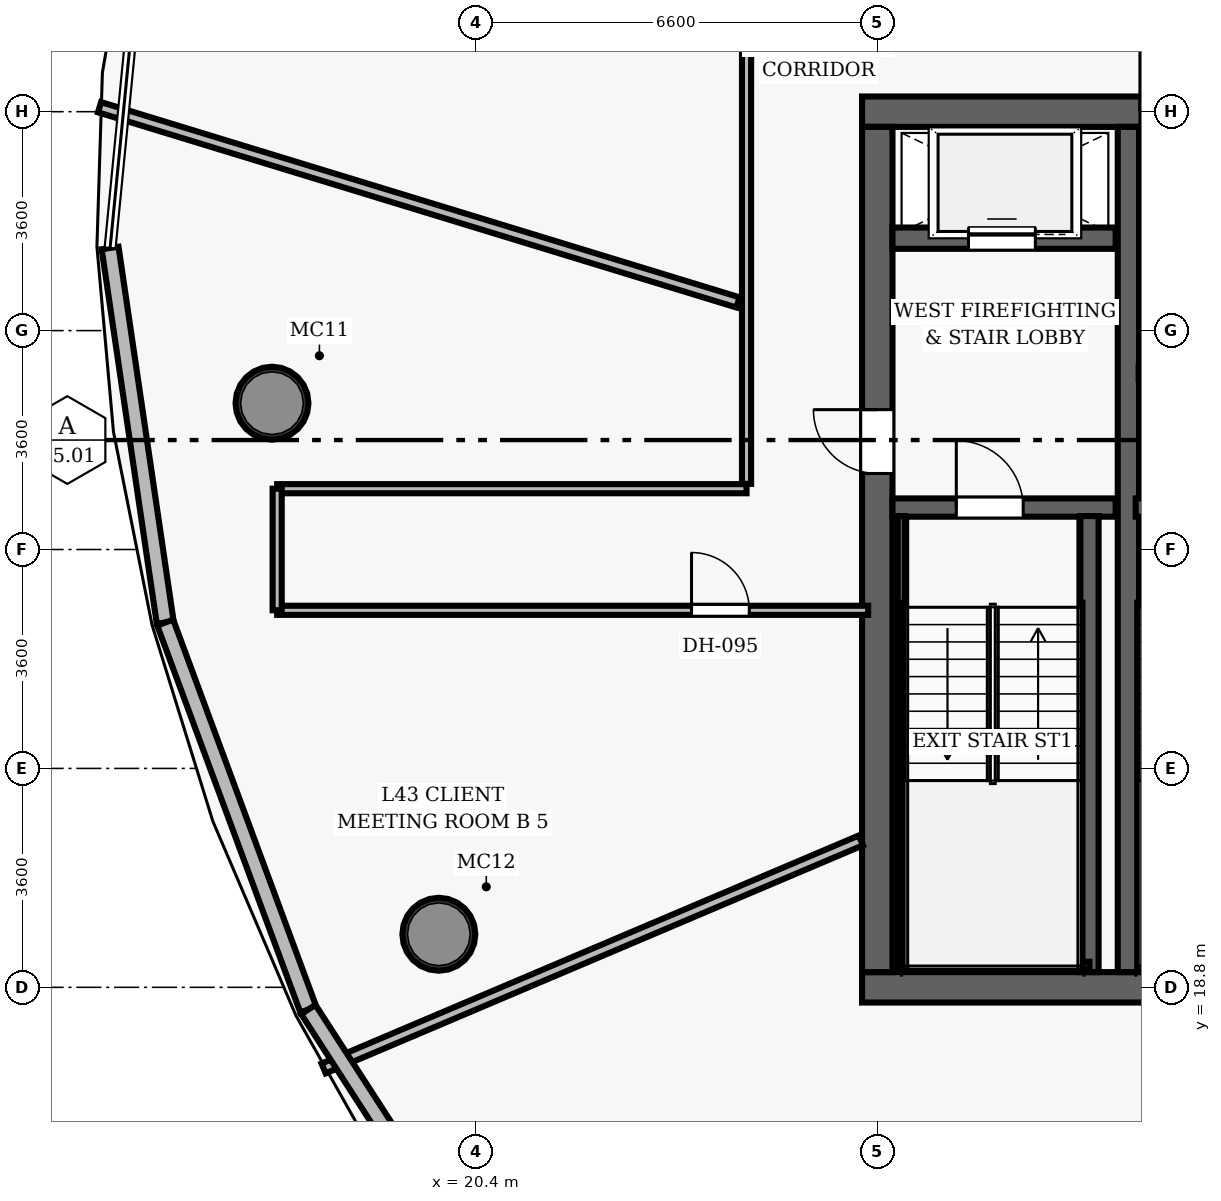
"""IFC4 building model, lengths in metres.
Left out: names, types, materials, properties, quantities, classifications, styles, units other than length and angle.
Written with IfcOpenShell. Run it as: python <this file> out.ifc"""

import sys

from ifc_helpers import new_model, si_unit, direction, frame, frame_2d, origin, origin_2d, place, context, subcontext, project, spatial, rectangle, hollow_circle, extrude, element, fill, save


model = new_model("IFC4")
c1 = context("Model", 3, precision=1e-05, world=origin(), true_north=direction((0.0, 1.0)))
c2 = subcontext(c1, "Body", "Model", "MODEL_VIEW")
j1 = project(units=[si_unit("LENGTHUNIT", "METRE"), si_unit("PLANEANGLEUNIT", "RADIAN")], contexts=[c1])
p1 = place(None, origin())
s1 = spatial("IfcSite", under=j1, at=p1, CompositionType="ELEMENT")
p2 = place(p1, origin())
s2 = spatial("IfcBuilding", under=s1, at=p2, CompositionType="ELEMENT")
p3 = place(p2, frame((0.0, 0.0, 171.2)))
s3 = spatial("IfcBuildingStorey", under=s2, at=p3, CompositionType="ELEMENT", Elevation=171.2)
p4 = place(p3, frame((26.75, 18.8, 0.0), z_axis=(0.0, 0.0, 1.0), x_axis=(1.0, 0.0, 0.0)))
e1 = element("IfcWall", 1, at=p4, inside=s3, PredefinedType="SHEAR", context=c2, shape_type="SweptSolid", body=[
    extrude(rectangle(XDim=22.5, YDim=0.5, at=frame_2d((11.25, 0.0))), origin(), (0.0, 0.0, 1.0), 3.85),
])
p5 = place(p4, frame((14.47, 0.0, 0.0)))
e2 = element("IfcOpeningElement", 2, at=p5, cuts=e1, PredefinedType="OPENING", context=c2, shape_type="SweptSolid", body=[
    extrude(rectangle(XDim=1.05, YDim=2.15, at=frame_2d((0.525, 1.075))), frame((0.0, 0.26, 0.0), z_axis=(0.0, -1.0, 0.0), x_axis=(1.0, 0.0, 0.0)), (0.0, 0.0, 1.0), 0.52),
])
p6 = place(p3, frame((26.75, 33.2, 0.0), z_axis=(0.0, 0.0, 1.0), x_axis=(1.0, 0.0, 0.0)))
e3 = element("IfcWall", 3, at=p6, inside=s3, PredefinedType="SHEAR", context=c2, shape_type="SweptSolid", body=[
    extrude(rectangle(XDim=22.5, YDim=0.5, at=frame_2d((11.25, 0.0))), origin(), (0.0, 0.0, 1.0), 3.85),
])
p7 = place(p6, frame((4.57, 0.0, 0.0)))
e4 = element("IfcOpeningElement", 4, at=p7, cuts=e3, PredefinedType="OPENING", context=c2, shape_type="SweptSolid", body=[
    extrude(rectangle(XDim=1.05, YDim=2.15, at=frame_2d((0.525, 1.075))), frame((0.0, 0.26, 0.0), z_axis=(0.0, -1.0, 0.0), x_axis=(1.0, 0.0, 0.0)), (0.0, 0.0, 1.0), 0.52),
])
p8 = place(p6, frame((14.47, 0.0, 0.0)))
e5 = element("IfcOpeningElement", 5, at=p8, cuts=e3, PredefinedType="OPENING", context=c2, shape_type="SweptSolid", body=[
    extrude(rectangle(XDim=1.05, YDim=2.15, at=frame_2d((0.525, 1.075))), frame((0.0, 0.26, 0.0), z_axis=(0.0, -1.0, 0.0), x_axis=(1.0, 0.0, 0.0)), (0.0, 0.0, 1.0), 0.52),
])
p9 = place(p3, frame((27.0, 19.05, 0.0), z_axis=(0.0, 0.0, 1.0), x_axis=(0.0, 1.0, 0.0)))
e6 = element("IfcWall", 6, at=p9, inside=s3, PredefinedType="SHEAR", context=c2, shape_type="SweptSolid", body=[
    extrude(rectangle(XDim=13.9, YDim=0.5, at=frame_2d((6.95, 0.0))), origin(), (0.0, 0.0, 1.0), 3.85),
])
p10 = place(p9, frame((8.2, 0.0, 0.0)))
e7 = element("IfcOpeningElement", 7, at=p10, cuts=e6, PredefinedType="OPENING", context=c2, shape_type="SweptSolid", body=[
    extrude(rectangle(XDim=1.05, YDim=2.15, at=frame_2d((0.525, 1.075))), frame((0.0, 0.26, 0.0), z_axis=(0.0, -1.0, 0.0), x_axis=(1.0, 0.0, 0.0)), (0.0, 0.0, 1.0), 0.52),
])
p11 = place(p3, frame((31.13, 19.05, 0.0), z_axis=(0.0, 0.0, 1.0), x_axis=(0.0, 1.0, 0.0)))
e8 = element("IfcWall", 8, at=p11, inside=s3, PredefinedType="SHEAR", context=c2, shape_type="SweptSolid", body=[
    extrude(rectangle(XDim=13.9, YDim=0.35, at=frame_2d((6.95, 0.0))), origin(), (0.0, 0.0, 1.0), 3.85),
])
for number, where, z_axis, x_axis in (
    (9, (17.045, 28.406, 0.0), (0.0, 0.0, 1.0), (1.0, 0.0, 0.0)),
    (10, (19.79, 19.673, 0.0), (0.0, 0.0, 1.0), (1.0, 0.0, 0.0)),
):
    element("IfcColumn", number, at=place(p3, frame(where, z_axis=z_axis, x_axis=x_axis)), inside=s3, PredefinedType="COLUMN", context=c2, shape_type="SweptSolid", body=[
        extrude(hollow_circle(Radius=0.6, WallThickness=0.05, at=origin_2d()), origin(), (0.0, 0.0, 1.0), 3.85),
    ])
p12 = place(p3, frame((27.25, 26.69, 0.0), z_axis=(0.0, 0.0, 1.0), x_axis=(1.0, 0.0, 0.0)))
e11 = element("IfcWall", 11, at=p12, inside=s3, PredefinedType="SHEAR", context=c2, shape_type="SweptSolid", body=[
    extrude(rectangle(XDim=3.67, YDim=0.3, at=frame_2d((1.835, 0.0))), origin(), (0.0, 0.0, 1.0), 3.85),
])
p13 = place(p12, frame((1.05, 0.0, 0.0)))
e12 = element("IfcOpeningElement", 12, at=p13, cuts=e11, PredefinedType="OPENING", context=c2, shape_type="SweptSolid", body=[
    extrude(rectangle(XDim=1.1, YDim=2.15, at=frame_2d((0.55, 1.075))), frame((0.0, 0.16, 0.0), z_axis=(0.0, -1.0, 0.0), x_axis=(1.0, 0.0, 0.0)), (0.0, 0.0, 1.0), 0.32),
])
p14 = place(p3, frame((30.49, 19.05, 0.0), z_axis=(0.0, 0.0, 1.0), x_axis=(0.0, 1.0, 0.0)))
e13 = element("IfcWall", 13, at=p14, inside=s3, PredefinedType="SHEAR", context=c2, shape_type="SweptSolid", body=[
    extrude(rectangle(XDim=7.5, YDim=0.3, at=frame_2d((3.75, 0.0))), origin(), (0.0, 0.0, 1.0), 3.85),
])
p15 = place(p3, frame((27.395, 19.1, 0.0), z_axis=(0.0, 0.0, 1.0), x_axis=(0.0, 1.0, 0.0)))
e14 = element("IfcWall", 14, at=p15, inside=s3, PredefinedType="SHEAR", context=c2, shape_type="SweptSolid", body=[
    extrude(rectangle(XDim=7.45, YDim=0.12, at=frame_2d((3.725, 0.0))), origin(), (0.0, 0.0, 1.0), 3.85),
])
p16 = place(p3, frame((27.395, 19.16, 0.0), z_axis=(0.0, 0.0, 1.0), x_axis=(1.0, 0.0, 0.0)))
e15 = element("IfcWall", 15, at=p16, inside=s3, PredefinedType="SHEAR", context=c2, shape_type="SweptSolid", body=[
    extrude(rectangle(XDim=3.095, YDim=0.12, at=frame_2d((1.547, 0.0))), origin(), (0.0, 0.0, 1.0), 3.85),
])
p17 = place(p3, frame((27.25, 31.12, 0.0), z_axis=(0.0, 0.0, 1.0), x_axis=(1.0, 0.0, 0.0)))
e16 = element("IfcWall", 16, at=p17, inside=s3, PredefinedType="SHEAR", context=c2, shape_type="SweptSolid", body=[
    extrude(rectangle(XDim=3.67, YDim=0.35, at=frame_2d((1.835, 0.0))), origin(), (0.0, 0.0, 1.0), 3.035),
])
p18 = place(p17, frame((1.25, 0.0, 0.0)))
e17 = element("IfcOpeningElement", 17, at=p18, cuts=e16, PredefinedType="OPENING", context=c2, shape_type="SweptSolid", body=[
    extrude(rectangle(XDim=1.1, YDim=2.15, at=frame_2d((0.55, 1.075))), frame((0.0, 0.185, 0.0), z_axis=(0.0, -1.0, 0.0), x_axis=(1.0, 0.0, 0.0)), (0.0, 0.0, 1.0), 0.37),
])
p19 = place(p3, frame((31.25, 26.69, 0.0), z_axis=(0.0, 0.0, 1.0), x_axis=(1.0, 0.0, 0.0)))
e18 = element("IfcWall", 18, at=p19, inside=s3, PredefinedType="SHEAR", context=c2, shape_type="SweptSolid", body=[
    extrude(rectangle(XDim=3.56, YDim=0.3, at=frame_2d((1.78, 0.0))), origin(), (0.0, 0.0, 1.0), 3.85),
])
p20 = place(p19, frame((1.55, 0.0, 0.0)))
e19 = element("IfcOpeningElement", 19, at=p20, cuts=e18, PredefinedType="OPENING", context=c2, shape_type="SweptSolid", body=[
    extrude(rectangle(XDim=1.1, YDim=2.15, at=frame_2d((0.55, 1.075))), frame((0.0, 0.16, 0.0), z_axis=(0.0, -1.0, 0.0), x_axis=(1.0, 0.0, 0.0)), (0.0, 0.0, 1.0), 0.32),
])
p21 = place(p3, frame((31.3, 19.16, 0.0), z_axis=(0.0, 0.0, 1.0), x_axis=(1.0, 0.0, 0.0)))
e20 = element("IfcWall", 20, at=p21, inside=s3, PredefinedType="SHEAR", context=c2, shape_type="SweptSolid", body=[
    extrude(rectangle(XDim=3.04, YDim=0.12, at=frame_2d((1.52, 0.0))), origin(), (0.0, 0.0, 1.0), 3.85),
])
p22 = place(p3, frame((31.3, 28.9, 0.0), z_axis=(0.0, 0.0, 1.0), x_axis=(1.0, 0.0, 0.0)))
e21 = element("IfcWall", 21, at=p22, inside=s3, PredefinedType="PARTITIONING", context=c2, shape_type="SweptSolid", body=[
    extrude(rectangle(XDim=1.12, YDim=0.2, at=frame_2d((0.56, 0.0))), origin(), (0.0, 0.0, 1.0), 3.035),
])
p23 = place(p3, frame((24.85, 27.08, 0.0), z_axis=(0.0, 0.0, 1.0), x_axis=(0.0, 1.0, 0.0)))
e22 = element("IfcWall", 22, at=p23, inside=s3, PredefinedType="PARTITIONING", context=c2, shape_type="SweptSolid", body=[
    extrude(rectangle(XDim=8.12, YDim=0.15, at=frame_2d((4.06, 0.0))), origin(), (0.0, 0.0, 1.0), 3.035),
])
p24 = place(p3, frame((17.131, 27.0, 0.0), z_axis=(0.0, 0.0, 1.0), x_axis=(1.0, 0.0, 0.0)))
e23 = element("IfcWall", 23, at=p24, inside=s3, PredefinedType="PARTITIONING", context=c2, shape_type="SweptSolid", body=[
    extrude(rectangle(XDim=7.719, YDim=0.15, at=frame_2d((3.86, 0.0))), origin(), (0.0, 0.0, 1.0), 3.035),
])
p25 = place(p3, frame((17.131, 25.0, 0.0), z_axis=(0.0, 0.0, 1.0), x_axis=(1.0, 0.0, 0.0)))
e24 = element("IfcWall", 24, at=p25, inside=s3, PredefinedType="PARTITIONING", context=c2, shape_type="SweptSolid", body=[
    extrude(rectangle(XDim=9.719, YDim=0.15, at=frame_2d((4.86, 0.0))), origin(), (0.0, 0.0, 1.0), 3.035),
])
p26 = place(p25, frame((6.814, 0.0, 0.0)))
e25 = element("IfcOpeningElement", 25, at=p26, cuts=e24, PredefinedType="OPENING", context=c2, shape_type="SweptSolid", body=[
    extrude(rectangle(XDim=0.95, YDim=2.15, at=frame_2d((0.475, 1.075))), frame((0.0, 0.085, 0.0), z_axis=(0.0, -1.0, 0.0), x_axis=(1.0, 0.0, 0.0)), (0.0, 0.0, 1.0), 0.17),
])
p27 = place(p3, frame((17.131, 25.0, 0.0), z_axis=(0.0, 0.0, 1.0), x_axis=(0.0, 1.0, 0.0)))
e26 = element("IfcWall", 26, at=p27, inside=s3, PredefinedType="PARTITIONING", context=c2, shape_type="SweptSolid", body=[
    extrude(rectangle(XDim=2.0, YDim=0.15, at=frame_2d((1.0, 0.0))), origin(), (0.0, 0.0, 1.0), 3.035),
])
p28 = place(p3, frame((24.71, 30.063, 0.0), z_axis=(0.0, 0.0, 1.0), x_axis=(-0.956305303445, 0.292369913984, 0.0)))
e27 = element("IfcWall", 27, at=p28, inside=s3, PredefinedType="PARTITIONING", context=c2, shape_type="SweptSolid", body=[
    extrude(rectangle(XDim=10.981, YDim=0.175, at=frame_2d((5.49, 0.0))), origin(), (0.0, 0.0, 1.0), 3.035),
])
p29 = place(p3, frame((26.73, 21.216, 0.0), z_axis=(0.0, 0.0, 1.0), x_axis=(-0.920506390996, -0.390727506244, 0.0)))
e28 = element("IfcWall", 28, at=p29, inside=s3, PredefinedType="PARTITIONING", context=c2, shape_type="SweptSolid", body=[
    extrude(rectangle(XDim=9.599, YDim=0.175, at=frame_2d((4.799, 0.0))), origin(), (0.0, 0.0, 1.0), 3.035),
])
p30 = place(p3, frame((34.194, 18.53, 0.0), z_axis=(0.0, 0.0, 1.0), x_axis=(-0.453989957323, -0.891006800563, 0.0)))
e29 = element("IfcWall", 29, at=p30, inside=s3, PredefinedType="PARTITIONING", context=c2, shape_type="SweptSolid", body=[
    extrude(rectangle(XDim=13.449, YDim=0.175, at=frame_2d((6.725, 0.0))), origin(), (0.0, 0.0, 1.0), 3.035),
])
p31 = place(p3, frame((15.289, 24.799, 0.0), z_axis=(0.0, 0.0, 1.0), x_axis=(-0.145586553234, 0.989345518774, 0.0)))
e30 = element("IfcWall", 30, at=p31, inside=s3, PredefinedType="SOLIDWALL", context=c2, shape_type="SweptSolid", body=[
    extrude(rectangle(XDim=6.227, YDim=0.28, at=frame_2d((3.113, 0.0))), origin(), (0.0, 0.0, 1.0), 3.62),
])
p32 = place(p3, frame((17.643, 18.435, 0.0), z_axis=(0.0, 0.0, 1.0), x_axis=(-0.346860746189, 0.937916639555, 0.0)))
e31 = element("IfcWall", 31, at=p32, inside=s3, PredefinedType="SOLIDWALL", context=c2, shape_type="SweptSolid", body=[
    extrude(rectangle(XDim=6.784, YDim=0.28, at=frame_2d((3.392, 0.0))), origin(), (0.0, 0.0, 1.0), 3.62),
])
p33 = place(p3, frame((21.45, 12.541, 0.0), z_axis=(0.0, 0.0, 1.0), x_axis=(-0.542607772283, 0.839986193612, 0.0)))
e32 = element("IfcWall", 32, at=p33, inside=s3, PredefinedType="SOLIDWALL", context=c2, shape_type="SweptSolid", body=[
    extrude(rectangle(XDim=7.018, YDim=0.28, at=frame_2d((3.509, 0.0))), origin(), (0.0, 0.0, 1.0), 3.62),
])
p34 = place(p13, origin())
e33 = element("IfcDoor", 33, at=p34, inside=s3, OperationType="SINGLE_SWING_LEFT", PredefinedType="DOOR", context=c2, shape_type="SweptSolid", body=[
    extrude(rectangle(XDim=1.1, YDim=2.15, at=frame_2d((0.55, 1.075))), frame((0.0, 0.025, 0.0), z_axis=(0.0, -1.0, 0.0), x_axis=(1.0, 0.0, 0.0)), (0.0, 0.0, 1.0), 0.05),
])
fill(e12, e33)
p35 = place(p10, origin())
e34 = element("IfcDoor", 34, at=p35, inside=s3, OperationType="SINGLE_SWING_RIGHT", PredefinedType="DOOR", context=c2, shape_type="SweptSolid", body=[
    extrude(rectangle(XDim=1.05, YDim=2.15, at=frame_2d((0.525, 1.075))), frame((0.0, 0.025, 0.0), z_axis=(0.0, -1.0, 0.0), x_axis=(1.0, 0.0, 0.0)), (0.0, 0.0, 1.0), 0.05),
])
fill(e7, e34)
p36 = place(p7, origin())
e35 = element("IfcDoor", 35, at=p36, inside=s3, OperationType="SINGLE_SWING_LEFT", PredefinedType="DOOR", context=c2, shape_type="SweptSolid", body=[
    extrude(rectangle(XDim=1.05, YDim=2.15, at=frame_2d((0.525, 1.075))), frame((0.0, 0.025, 0.0), z_axis=(0.0, -1.0, 0.0), x_axis=(1.0, 0.0, 0.0)), (0.0, 0.0, 1.0), 0.05),
])
fill(e4, e35)
p37 = place(p26, origin())
e36 = element("IfcDoor", 36, at=p37, inside=s3, OperationType="SINGLE_SWING_LEFT", PredefinedType="DOOR", context=c2, shape_type="SweptSolid", body=[
    extrude(rectangle(XDim=0.95, YDim=2.15, at=frame_2d((0.475, 1.075))), frame((0.0, 0.025, 0.0), z_axis=(0.0, -1.0, 0.0), x_axis=(1.0, 0.0, 0.0)), (0.0, 0.0, 1.0), 0.05),
])
fill(e25, e36)
p38 = place(p18, origin())
e37 = element("IfcDoor", 37, at=p38, inside=s3, OperationType="SLIDING_TO_LEFT", PredefinedType="DOOR", context=c2, shape_type="SweptSolid", body=[
    extrude(rectangle(XDim=1.1, YDim=2.15, at=frame_2d((0.55, 1.075))), frame((0.0, 0.025, 0.0), z_axis=(0.0, -1.0, 0.0), x_axis=(1.0, 0.0, 0.0)), (0.0, 0.0, 1.0), 0.05),
])
fill(e17, e37)
save(model, sys.argv[1])
